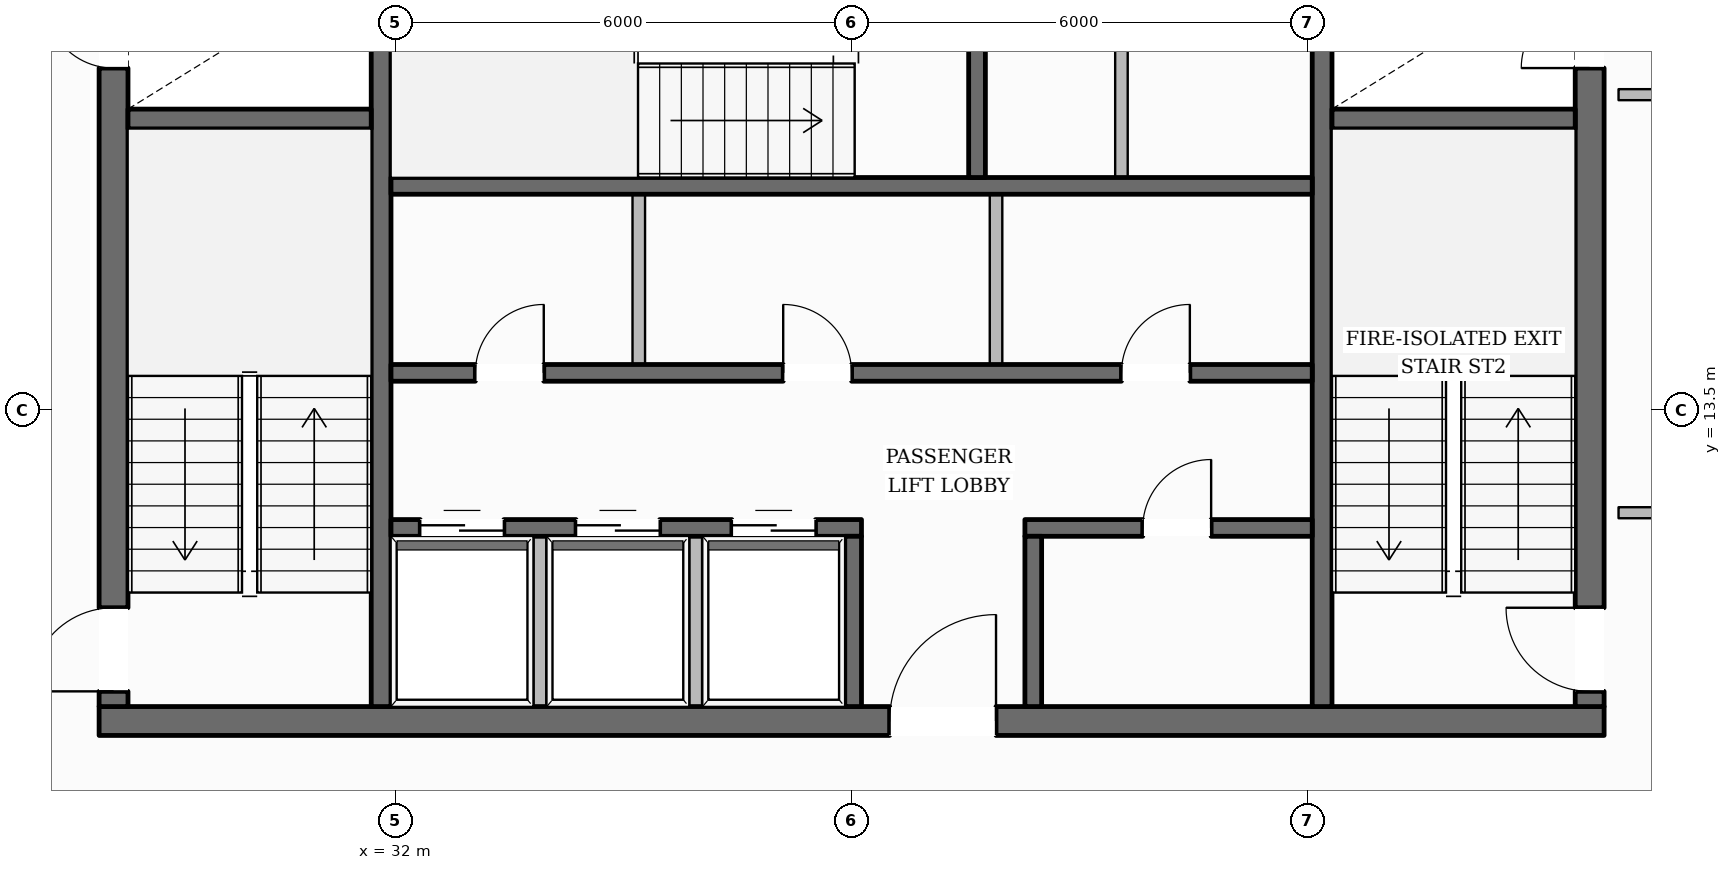
"""IFC4 building model, lengths in metres.
Left out: names, types, materials, properties, quantities, classifications, styles, units other than length and angle.
Written with IfcOpenShell. Run it as: python <this file> out.ifc"""

import sys

from ifc_helpers import new_model, si_unit, direction, frame, frame_2d, origin, place, context, subcontext, project, spatial, rectangle, extrude, element, fill, save


model = new_model("IFC4")
c1 = context("Model", 3, precision=1e-05, world=origin(), true_north=direction((0.0, 1.0)))
c2 = subcontext(c1, "Body", "Model", "MODEL_VIEW")
j1 = project(units=[si_unit("LENGTHUNIT", "METRE"), si_unit("PLANEANGLEUNIT", "RADIAN")], contexts=[c1])
p1 = place(None, origin())
s1 = spatial("IfcSite", under=j1, at=p1, CompositionType="ELEMENT")
p2 = place(p1, origin())
s2 = spatial("IfcBuilding", under=s1, at=p2, CompositionType="ELEMENT")
p3 = place(p2, frame((0.0, 0.0, 266.45)))
s3 = spatial("IfcBuildingStorey", under=s2, at=p3, CompositionType="ELEMENT", Elevation=266.45)
p4 = place(p3, frame((28.1, 9.41, 0.0), z_axis=(0.0, 0.0, 1.0), x_axis=(1.0, 0.0, 0.0)))
e1 = element("IfcWall", 1, at=p4, inside=s3, PredefinedType="SOLIDWALL", context=c2, shape_type="SweptSolid", body=[
    extrude(rectangle(XDim=19.8, YDim=0.38, at=frame_2d((9.9, 0.0))), origin(), (0.0, 0.0, 1.0), 3.61),
])
p5 = place(p4, frame((10.4, 0.0, 0.0)))
e2 = element("IfcOpeningElement", 2, at=p5, cuts=e1, PredefinedType="OPENING", context=c2, shape_type="SweptSolid", body=[
    extrude(rectangle(XDim=1.4, YDim=2.2, at=frame_2d((0.7, 1.1))), frame((0.0, 0.2, 0.0), z_axis=(0.0, -1.0, 0.0), x_axis=(1.0, 0.0, 0.0)), (0.0, 0.0, 1.0), 0.4),
])
p6 = place(p3, frame((28.29, 9.6, 0.0), z_axis=(0.0, 0.0, 1.0), x_axis=(0.0, 1.0, 0.0)))
e3 = element("IfcWall", 3, at=p6, inside=s3, PredefinedType="SOLIDWALL", context=c2, shape_type="SweptSolid", body=[
    extrude(rectangle(XDim=13.0, YDim=0.38, at=frame_2d((6.5, 0.0))), origin(), (0.0, 0.0, 1.0), 3.61),
])
p7 = place(p6, frame((0.2, 0.0, 0.0)))
e4 = element("IfcOpeningElement", 4, at=p7, cuts=e3, PredefinedType="OPENING", context=c2, shape_type="SweptSolid", body=[
    extrude(rectangle(XDim=1.1, YDim=2.15, at=frame_2d((0.55, 1.075))), frame((0.0, 0.2, 0.0), z_axis=(0.0, -1.0, 0.0), x_axis=(1.0, 0.0, 0.0)), (0.0, 0.0, 1.0), 0.4),
])
p8 = place(p6, frame((8.4, 0.0, 0.0)))
e5 = element("IfcOpeningElement", 5, at=p8, cuts=e3, PredefinedType="OPENING", context=c2, shape_type="SweptSolid", body=[
    extrude(rectangle(XDim=0.9, YDim=2.1, at=frame_2d((0.45, 1.05))), frame((0.0, 0.2, 0.0), z_axis=(0.0, -1.0, 0.0), x_axis=(1.0, 0.0, 0.0)), (0.0, 0.0, 1.0), 0.4),
])
p9 = place(p3, frame((47.71, 9.6, 0.0), z_axis=(0.0, 0.0, 1.0), x_axis=(0.0, 1.0, 0.0)))
e6 = element("IfcWall", 6, at=p9, inside=s3, PredefinedType="SOLIDWALL", context=c2, shape_type="SweptSolid", body=[
    extrude(rectangle(XDim=13.0, YDim=0.38, at=frame_2d((6.5, 0.0))), origin(), (0.0, 0.0, 1.0), 3.61),
])
p10 = place(p9, frame((0.2, 0.0, 0.0)))
e7 = element("IfcOpeningElement", 7, at=p10, cuts=e6, PredefinedType="OPENING", context=c2, shape_type="SweptSolid", body=[
    extrude(rectangle(XDim=1.1, YDim=2.15, at=frame_2d((0.55, 1.075))), frame((0.0, 0.2, 0.0), z_axis=(0.0, -1.0, 0.0), x_axis=(1.0, 0.0, 0.0)), (0.0, 0.0, 1.0), 0.4),
])
p11 = place(p9, frame((8.4, 0.0, 0.0)))
e8 = element("IfcOpeningElement", 8, at=p11, cuts=e6, PredefinedType="OPENING", context=c2, shape_type="SweptSolid", body=[
    extrude(rectangle(XDim=0.9, YDim=2.1, at=frame_2d((0.45, 1.05))), frame((0.0, 0.2, 0.0), z_axis=(0.0, -1.0, 0.0), x_axis=(1.0, 0.0, 0.0)), (0.0, 0.0, 1.0), 0.4),
])
p12 = place(p3, frame((31.81, 9.6, 0.0), z_axis=(0.0, 0.0, 1.0), x_axis=(0.0, 1.0, 0.0)))
e9 = element("IfcWall", 9, at=p12, inside=s3, PredefinedType="SHEAR", context=c2, shape_type="SweptSolid", body=[
    extrude(rectangle(XDim=13.0, YDim=0.26, at=frame_2d((6.5, 0.0))), origin(), (0.0, 0.0, 1.0), 3.61),
])
p13 = place(p12, frame((10.925, 0.0, 0.0)))
e10 = element("IfcOpeningElement", 10, at=p13, cuts=e9, PredefinedType="OPENING", context=c2, shape_type="SweptSolid", body=[
    extrude(rectangle(XDim=1.25, YDim=2.25, at=frame_2d((0.625, 1.125))), frame((0.0, 0.14, 0.0), z_axis=(0.0, -1.0, 0.0), x_axis=(1.0, 0.0, 0.0)), (0.0, 0.0, 1.0), 0.28),
])
p14 = place(p3, frame((44.19, 9.6, 0.0), z_axis=(0.0, 0.0, 1.0), x_axis=(0.0, 1.0, 0.0)))
e11 = element("IfcWall", 11, at=p14, inside=s3, PredefinedType="SHEAR", context=c2, shape_type="SweptSolid", body=[
    extrude(rectangle(XDim=13.0, YDim=0.26, at=frame_2d((6.5, 0.0))), origin(), (0.0, 0.0, 1.0), 3.61),
])
p15 = place(p14, frame((10.925, 0.0, 0.0)))
e12 = element("IfcOpeningElement", 12, at=p15, cuts=e11, PredefinedType="OPENING", context=c2, shape_type="SweptSolid", body=[
    extrude(rectangle(XDim=1.25, YDim=2.25, at=frame_2d((0.625, 1.125))), frame((0.0, 0.14, 0.0), z_axis=(0.0, -1.0, 0.0), x_axis=(1.0, 0.0, 0.0)), (0.0, 0.0, 1.0), 0.28),
])
for number, where, z_axis, x_axis in (
    (13, (28.48, 17.33, 0.0), (0.0, 0.0, 1.0), (1.0, 0.0, 0.0)),
    (14, (44.32, 17.33, 0.0), (0.0, 0.0, 1.0), (1.0, 0.0, 0.0)),
):
    element("IfcWall", number, at=place(p3, frame(where, z_axis=z_axis, x_axis=x_axis)), inside=s3, PredefinedType="SHEAR", context=c2, shape_type="SweptSolid", body=[
        extrude(rectangle(XDim=3.2, YDim=0.26, at=frame_2d((1.6, 0.0))), origin(), (0.0, 0.0, 1.0), 3.61),
    ])
p16 = place(p3, frame((31.94, 16.45, 0.0), z_axis=(0.0, 0.0, 1.0), x_axis=(1.0, 0.0, 0.0)))
e15 = element("IfcWall", 15, at=p16, inside=s3, PredefinedType="SOLIDWALL", context=c2, shape_type="SweptSolid", body=[
    extrude(rectangle(XDim=12.12, YDim=0.22, at=frame_2d((6.06, 0.0))), origin(), (0.0, 0.0, 1.0), 3.61),
])
p17 = place(p3, frame((39.65, 16.56, 0.0), z_axis=(0.0, 0.0, 1.0), x_axis=(0.0, 1.0, 0.0)))
e16 = element("IfcWall", 16, at=p17, inside=s3, PredefinedType="SOLIDWALL", context=c2, shape_type="SweptSolid", body=[
    extrude(rectangle(XDim=3.2, YDim=0.22, at=frame_2d((1.6, 0.0))), origin(), (0.0, 0.0, 1.0), 3.61),
])
p18 = place(p3, frame((31.94, 13.99, 0.0), z_axis=(0.0, 0.0, 1.0), x_axis=(1.0, 0.0, 0.0)))
e17 = element("IfcWall", 17, at=p18, inside=s3, PredefinedType="SOLIDWALL", context=c2, shape_type="SweptSolid", body=[
    extrude(rectangle(XDim=12.12, YDim=0.22, at=frame_2d((6.06, 0.0))), origin(), (0.0, 0.0, 1.0), 3.61),
])
p19 = place(p18, frame((1.11, 0.0, 0.0)))
e18 = element("IfcOpeningElement", 18, at=p19, cuts=e17, PredefinedType="OPENING", context=c2, shape_type="SweptSolid", body=[
    extrude(rectangle(XDim=0.9, YDim=2.1, at=frame_2d((0.45, 1.05))), frame((0.0, 0.12, 0.0), z_axis=(0.0, -1.0, 0.0), x_axis=(1.0, 0.0, 0.0)), (0.0, 0.0, 1.0), 0.24),
])
p20 = place(p18, frame((5.16, 0.0, 0.0)))
e19 = element("IfcOpeningElement", 19, at=p20, cuts=e17, PredefinedType="OPENING", context=c2, shape_type="SweptSolid", body=[
    extrude(rectangle(XDim=0.9, YDim=2.1, at=frame_2d((0.45, 1.05))), frame((0.0, 0.12, 0.0), z_axis=(0.0, -1.0, 0.0), x_axis=(1.0, 0.0, 0.0)), (0.0, 0.0, 1.0), 0.24),
])
p21 = place(p18, frame((9.61, 0.0, 0.0)))
e20 = element("IfcOpeningElement", 20, at=p21, cuts=e17, PredefinedType="OPENING", context=c2, shape_type="SweptSolid", body=[
    extrude(rectangle(XDim=0.9, YDim=2.1, at=frame_2d((0.45, 1.05))), frame((0.0, 0.12, 0.0), z_axis=(0.0, -1.0, 0.0), x_axis=(1.0, 0.0, 0.0)), (0.0, 0.0, 1.0), 0.24),
])
p22 = place(p3, frame((31.94, 11.95, 0.0), z_axis=(0.0, 0.0, 1.0), x_axis=(1.0, 0.0, 0.0)))
e21 = element("IfcWall", 21, at=p22, inside=s3, PredefinedType="SOLIDWALL", context=c2, shape_type="SweptSolid", body=[
    extrude(rectangle(XDim=6.19, YDim=0.22, at=frame_2d((3.095, 0.0))), origin(), (0.0, 0.0, 1.0), 3.61),
])
p23 = place(p22, frame((0.385, 0.0, 0.0)))
e22 = element("IfcOpeningElement", 22, at=p23, cuts=e21, PredefinedType="OPENING", context=c2, shape_type="SweptSolid", body=[
    extrude(rectangle(XDim=1.1, YDim=2.2, at=frame_2d((0.55, 1.1))), frame((0.0, 0.12, 0.0), z_axis=(0.0, -1.0, 0.0), x_axis=(1.0, 0.0, 0.0)), (0.0, 0.0, 1.0), 0.24),
])
p24 = place(p22, frame((2.435, 0.0, 0.0)))
e23 = element("IfcOpeningElement", 23, at=p24, cuts=e21, PredefinedType="OPENING", context=c2, shape_type="SweptSolid", body=[
    extrude(rectangle(XDim=1.1, YDim=2.2, at=frame_2d((0.55, 1.1))), frame((0.0, 0.12, 0.0), z_axis=(0.0, -1.0, 0.0), x_axis=(1.0, 0.0, 0.0)), (0.0, 0.0, 1.0), 0.24),
])
p25 = place(p22, frame((4.485, 0.0, 0.0)))
e24 = element("IfcOpeningElement", 24, at=p25, cuts=e21, PredefinedType="OPENING", context=c2, shape_type="SweptSolid", body=[
    extrude(rectangle(XDim=1.1, YDim=2.2, at=frame_2d((0.55, 1.1))), frame((0.0, 0.12, 0.0), z_axis=(0.0, -1.0, 0.0), x_axis=(1.0, 0.0, 0.0)), (0.0, 0.0, 1.0), 0.24),
])
p26 = place(p3, frame((40.28, 11.95, 0.0), z_axis=(0.0, 0.0, 1.0), x_axis=(1.0, 0.0, 0.0)))
e25 = element("IfcWall", 25, at=p26, inside=s3, PredefinedType="SOLIDWALL", context=c2, shape_type="SweptSolid", body=[
    extrude(rectangle(XDim=3.78, YDim=0.22, at=frame_2d((1.89, 0.0))), origin(), (0.0, 0.0, 1.0), 3.61),
])
p27 = place(p26, frame((1.55, 0.0, 0.0)))
e26 = element("IfcOpeningElement", 26, at=p27, cuts=e25, PredefinedType="OPENING", context=c2, shape_type="SweptSolid", body=[
    extrude(rectangle(XDim=0.9, YDim=2.1, at=frame_2d((0.45, 1.05))), frame((0.0, 0.12, 0.0), z_axis=(0.0, -1.0, 0.0), x_axis=(1.0, 0.0, 0.0)), (0.0, 0.0, 1.0), 0.24),
])
for number, where, z_axis, x_axis in (
    (27, (38.02, 9.6, 0.0), (0.0, 0.0, 1.0), (0.0, 1.0, 0.0)),
    (28, (40.39, 9.6, 0.0), (0.0, 0.0, 1.0), (0.0, 1.0, 0.0)),
):
    element("IfcWall", number, at=place(p3, frame(where, z_axis=z_axis, x_axis=x_axis)), inside=s3, PredefinedType="SOLIDWALL", context=c2, shape_type="SweptSolid", body=[
        extrude(rectangle(XDim=2.24, YDim=0.22, at=frame_2d((1.12, 0.0))), origin(), (0.0, 0.0, 1.0), 3.61),
    ])
p28 = place(p3, frame((15.894, 10.745, 0.0), z_axis=(0.0, 0.0, 1.0), x_axis=(0.502581466224, 0.864529854781, 0.0)))
e29 = element("IfcWall", 29, at=p28, inside=s3, PredefinedType="STANDARD", context=c2, shape_type="SweptSolid", body=[
    extrude(rectangle(XDim=37.873, YDim=0.35, at=frame_2d((18.937, 0.0))), origin(), (0.0, 0.0, 1.0), 3.196),
])
p29 = place(p28, frame((33.643, 0.0, 0.65)))
e30 = element("IfcOpeningElement", 30, at=p29, cuts=e29, PredefinedType="OPENING", context=c2, shape_type="SweptSolid", body=[
    extrude(rectangle(XDim=1.35, YDim=1.75, at=frame_2d((0.675, 0.875))), frame((0.0, 0.185, 0.0), z_axis=(0.0, -1.0, 0.0), x_axis=(1.0, 0.0, 0.0)), (0.0, 0.0, 1.0), 0.37),
])
p30 = place(p28, frame((27.491, 0.0, 0.65)))
e31 = element("IfcOpeningElement", 31, at=p30, cuts=e29, PredefinedType="OPENING", context=c2, shape_type="SweptSolid", body=[
    extrude(rectangle(XDim=1.35, YDim=1.75, at=frame_2d((0.675, 0.875))), frame((0.0, 0.185, 0.0), z_axis=(0.0, -1.0, 0.0), x_axis=(1.0, 0.0, 0.0)), (0.0, 0.0, 1.0), 0.37),
])
p31 = place(p28, frame((15.187, 0.0, 0.65)))
e32 = element("IfcOpeningElement", 32, at=p31, cuts=e29, PredefinedType="OPENING", context=c2, shape_type="SweptSolid", body=[
    extrude(rectangle(XDim=1.35, YDim=1.75, at=frame_2d((0.675, 0.875))), frame((0.0, 0.185, 0.0), z_axis=(0.0, -1.0, 0.0), x_axis=(1.0, 0.0, 0.0)), (0.0, 0.0, 1.0), 0.37),
])
p32 = place(p28, frame((9.035, 0.0, 0.65)))
e33 = element("IfcOpeningElement", 33, at=p32, cuts=e29, PredefinedType="OPENING", context=c2, shape_type="SweptSolid", body=[
    extrude(rectangle(XDim=1.35, YDim=1.75, at=frame_2d((0.675, 0.875))), frame((0.0, 0.185, 0.0), z_axis=(0.0, -1.0, 0.0), x_axis=(1.0, 0.0, 0.0)), (0.0, 0.0, 1.0), 0.37),
])
p33 = place(p28, frame((2.883, 0.0, 0.65)))
e34 = element("IfcOpeningElement", 34, at=p33, cuts=e29, PredefinedType="OPENING", context=c2, shape_type="SweptSolid", body=[
    extrude(rectangle(XDim=1.35, YDim=1.75, at=frame_2d((0.675, 0.875))), frame((0.0, 0.185, 0.0), z_axis=(0.0, -1.0, 0.0), x_axis=(1.0, 0.0, 0.0)), (0.0, 0.0, 1.0), 0.37),
])
p34 = place(p3, frame((41.166, 43.431, 0.0), z_axis=(0.0, 0.0, 1.0), x_axis=(0.50946847144, -0.860489323936, 0.0)))
e35 = element("IfcWall", 35, at=p34, inside=s3, PredefinedType="STANDARD", context=c2, shape_type="SweptSolid", body=[
    extrude(rectangle(XDim=38.404, YDim=0.35, at=frame_2d((19.202, 0.0))), origin(), (0.0, 0.0, 1.0), 3.196),
])
p35 = place(p34, frame((34.126, 0.0, 0.65)))
e36 = element("IfcOpeningElement", 36, at=p35, cuts=e35, PredefinedType="OPENING", context=c2, shape_type="SweptSolid", body=[
    extrude(rectangle(XDim=1.35, YDim=1.75, at=frame_2d((0.675, 0.875))), frame((0.0, 0.185, 0.0), z_axis=(0.0, -1.0, 0.0), x_axis=(1.0, 0.0, 0.0)), (0.0, 0.0, 1.0), 0.37),
])
p36 = place(p34, frame((27.884, 0.0, 0.65)))
e37 = element("IfcOpeningElement", 37, at=p36, cuts=e35, PredefinedType="OPENING", context=c2, shape_type="SweptSolid", body=[
    extrude(rectangle(XDim=1.35, YDim=1.75, at=frame_2d((0.675, 0.875))), frame((0.0, 0.185, 0.0), z_axis=(0.0, -1.0, 0.0), x_axis=(1.0, 0.0, 0.0)), (0.0, 0.0, 1.0), 0.37),
])
p37 = place(p34, frame((15.401, 0.0, 0.65)))
e38 = element("IfcOpeningElement", 38, at=p37, cuts=e35, PredefinedType="OPENING", context=c2, shape_type="SweptSolid", body=[
    extrude(rectangle(XDim=1.35, YDim=1.75, at=frame_2d((0.675, 0.875))), frame((0.0, 0.185, 0.0), z_axis=(0.0, -1.0, 0.0), x_axis=(1.0, 0.0, 0.0)), (0.0, 0.0, 1.0), 0.37),
])
p38 = place(p34, frame((9.159, 0.0, 0.65)))
e39 = element("IfcOpeningElement", 39, at=p38, cuts=e35, PredefinedType="OPENING", context=c2, shape_type="SweptSolid", body=[
    extrude(rectangle(XDim=1.35, YDim=1.75, at=frame_2d((0.675, 0.875))), frame((0.0, 0.185, 0.0), z_axis=(0.0, -1.0, 0.0), x_axis=(1.0, 0.0, 0.0)), (0.0, 0.0, 1.0), 0.37),
])
p39 = place(p34, frame((2.917, 0.0, 0.65)))
e40 = element("IfcOpeningElement", 40, at=p39, cuts=e35, PredefinedType="OPENING", context=c2, shape_type="SweptSolid", body=[
    extrude(rectangle(XDim=1.35, YDim=1.75, at=frame_2d((0.675, 0.875))), frame((0.0, 0.185, 0.0), z_axis=(0.0, -1.0, 0.0), x_axis=(1.0, 0.0, 0.0)), (0.0, 0.0, 1.0), 0.37),
])
for number, where, z_axis, x_axis in (
    (41, (33.9, 9.49, 0.0), (0.0, 0.0, 1.0), (0.0, 1.0, 0.0)),
    (42, (35.95, 9.49, 0.0), (0.0, 0.0, 1.0), (0.0, 1.0, 0.0)),
):
    element("IfcWall", number, at=place(p3, frame(where, z_axis=z_axis, x_axis=x_axis)), inside=s3, PredefinedType="PARTITIONING", context=c2, shape_type="SweptSolid", body=[
        extrude(rectangle(XDim=2.35, YDim=0.165, at=frame_2d((1.175, 0.0))), origin(), (0.0, 0.0, 1.0), 3.61),
    ])
for number, where, z_axis, x_axis in (
    (43, (35.2, 14.1, 0.0), (0.0, 0.0, 1.0), (0.0, 1.0, 0.0)),
    (44, (39.9, 14.1, 0.0), (0.0, 0.0, 1.0), (0.0, 1.0, 0.0)),
):
    element("IfcWall", number, at=place(p3, frame(where, z_axis=z_axis, x_axis=x_axis)), inside=s3, PredefinedType="PARTITIONING", context=c2, shape_type="SweptSolid", body=[
        extrude(rectangle(XDim=2.24, YDim=0.165, at=frame_2d((1.12, 0.0))), origin(), (0.0, 0.0, 1.0), 3.61),
    ])
p40 = place(p3, frame((41.55, 16.56, 0.0), z_axis=(0.0, 0.0, 1.0), x_axis=(0.0, 1.0, 0.0)))
e45 = element("IfcWall", 45, at=p40, inside=s3, PredefinedType="PARTITIONING", context=c2, shape_type="SweptSolid", body=[
    extrude(rectangle(XDim=3.2, YDim=0.165, at=frame_2d((1.6, 0.0))), origin(), (0.0, 0.0, 1.0), 3.61),
])
for number, where, z_axis, x_axis in (
    (46, (49.91, 17.65, 0.0), (0.0, 0.0, 1.0), (-1.0, 0.0, 0.0)),
    (47, (48.09, 12.15, 0.0), (0.0, 0.0, 1.0), (1.0, 0.0, 0.0)),
):
    element("IfcWall", number, at=place(p3, frame(where, z_axis=z_axis, x_axis=x_axis)), inside=s3, PredefinedType="PARTITIONING", context=c2, shape_type="SweptSolid", body=[
        extrude(rectangle(XDim=1.82, YDim=0.145, at=frame_2d((0.91, 0.0))), origin(), (0.0, 0.0, 1.0), 3.61),
    ])
p41 = place(p7, origin())
e48 = element("IfcDoor", 48, at=p41, inside=s3, OperationType="SINGLE_SWING_LEFT", PredefinedType="DOOR", context=c2, shape_type="SweptSolid", body=[
    extrude(rectangle(XDim=1.1, YDim=2.15, at=frame_2d((0.55, 1.075))), frame((0.0, 0.025, 0.0), z_axis=(0.0, -1.0, 0.0), x_axis=(1.0, 0.0, 0.0)), (0.0, 0.0, 1.0), 0.05),
])
fill(e4, e48)
p42 = place(p10, origin())
e49 = element("IfcDoor", 49, at=p42, inside=s3, OperationType="SINGLE_SWING_RIGHT", PredefinedType="DOOR", context=c2, shape_type="SweptSolid", body=[
    extrude(rectangle(XDim=1.1, YDim=2.15, at=frame_2d((0.55, 1.075))), frame((0.0, 0.025, 0.0), z_axis=(0.0, -1.0, 0.0), x_axis=(1.0, 0.0, 0.0)), (0.0, 0.0, 1.0), 0.05),
])
fill(e7, e49)
p43 = place(p8, origin())
e50 = element("IfcDoor", 50, at=p43, inside=s3, OperationType="SINGLE_SWING_RIGHT", PredefinedType="DOOR", context=c2, shape_type="SweptSolid", body=[
    extrude(rectangle(XDim=0.9, YDim=2.1, at=frame_2d((0.45, 1.05))), frame((0.0, 0.025, 0.0), z_axis=(0.0, -1.0, 0.0), x_axis=(1.0, 0.0, 0.0)), (0.0, 0.0, 1.0), 0.05),
])
fill(e5, e50)
p44 = place(p11, origin())
e51 = element("IfcDoor", 51, at=p44, inside=s3, OperationType="SINGLE_SWING_LEFT", PredefinedType="DOOR", context=c2, shape_type="SweptSolid", body=[
    extrude(rectangle(XDim=0.9, YDim=2.1, at=frame_2d((0.45, 1.05))), frame((0.0, 0.025, 0.0), z_axis=(0.0, -1.0, 0.0), x_axis=(1.0, 0.0, 0.0)), (0.0, 0.0, 1.0), 0.05),
])
fill(e8, e51)
p45 = place(p5, origin())
e52 = element("IfcDoor", 52, at=p45, inside=s3, OperationType="SINGLE_SWING_RIGHT", PredefinedType="DOOR", context=c2, shape_type="SweptSolid", body=[
    extrude(rectangle(XDim=1.4, YDim=2.2, at=frame_2d((0.7, 1.1))), frame((0.0, 0.025, 0.0), z_axis=(0.0, -1.0, 0.0), x_axis=(1.0, 0.0, 0.0)), (0.0, 0.0, 1.0), 0.05),
])
fill(e2, e52)
p46 = place(p23, origin())
e53 = element("IfcDoor", 53, at=p46, inside=s3, OperationType="DOUBLE_DOOR_SLIDING", PredefinedType="DOOR", context=c2, shape_type="SweptSolid", body=[
    extrude(rectangle(XDim=1.1, YDim=2.2, at=frame_2d((0.55, 1.1))), frame((0.0, 0.025, 0.0), z_axis=(0.0, -1.0, 0.0), x_axis=(1.0, 0.0, 0.0)), (0.0, 0.0, 1.0), 0.05),
])
fill(e22, e53)
p47 = place(p24, origin())
e54 = element("IfcDoor", 54, at=p47, inside=s3, OperationType="DOUBLE_DOOR_SLIDING", PredefinedType="DOOR", context=c2, shape_type="SweptSolid", body=[
    extrude(rectangle(XDim=1.1, YDim=2.2, at=frame_2d((0.55, 1.1))), frame((0.0, 0.025, 0.0), z_axis=(0.0, -1.0, 0.0), x_axis=(1.0, 0.0, 0.0)), (0.0, 0.0, 1.0), 0.05),
])
fill(e23, e54)
p48 = place(p25, origin())
e55 = element("IfcDoor", 55, at=p48, inside=s3, OperationType="DOUBLE_DOOR_SLIDING", PredefinedType="DOOR", context=c2, shape_type="SweptSolid", body=[
    extrude(rectangle(XDim=1.1, YDim=2.2, at=frame_2d((0.55, 1.1))), frame((0.0, 0.025, 0.0), z_axis=(0.0, -1.0, 0.0), x_axis=(1.0, 0.0, 0.0)), (0.0, 0.0, 1.0), 0.05),
])
fill(e24, e55)
p49 = place(p19, origin())
e56 = element("IfcDoor", 56, at=p49, inside=s3, OperationType="SINGLE_SWING_RIGHT", PredefinedType="DOOR", context=c2, shape_type="SweptSolid", body=[
    extrude(rectangle(XDim=0.9, YDim=2.1, at=frame_2d((0.45, 1.05))), frame((0.0, 0.025, 0.0), z_axis=(0.0, -1.0, 0.0), x_axis=(1.0, 0.0, 0.0)), (0.0, 0.0, 1.0), 0.05),
])
fill(e18, e56)
p50 = place(p20, origin())
e57 = element("IfcDoor", 57, at=p50, inside=s3, OperationType="SINGLE_SWING_LEFT", PredefinedType="DOOR", context=c2, shape_type="SweptSolid", body=[
    extrude(rectangle(XDim=0.9, YDim=2.1, at=frame_2d((0.45, 1.05))), frame((0.0, 0.025, 0.0), z_axis=(0.0, -1.0, 0.0), x_axis=(1.0, 0.0, 0.0)), (0.0, 0.0, 1.0), 0.05),
])
fill(e19, e57)
p51 = place(p21, origin())
e58 = element("IfcDoor", 58, at=p51, inside=s3, OperationType="SINGLE_SWING_RIGHT", PredefinedType="DOOR", context=c2, shape_type="SweptSolid", body=[
    extrude(rectangle(XDim=0.9, YDim=2.1, at=frame_2d((0.45, 1.05))), frame((0.0, 0.025, 0.0), z_axis=(0.0, -1.0, 0.0), x_axis=(1.0, 0.0, 0.0)), (0.0, 0.0, 1.0), 0.05),
])
fill(e20, e58)
p52 = place(p27, origin())
e59 = element("IfcDoor", 59, at=p52, inside=s3, OperationType="SINGLE_SWING_RIGHT", PredefinedType="DOOR", context=c2, shape_type="SweptSolid", body=[
    extrude(rectangle(XDim=0.9, YDim=2.1, at=frame_2d((0.45, 1.05))), frame((0.0, 0.025, 0.0), z_axis=(0.0, -1.0, 0.0), x_axis=(1.0, 0.0, 0.0)), (0.0, 0.0, 1.0), 0.05),
])
fill(e26, e59)
save(model, sys.argv[1])
